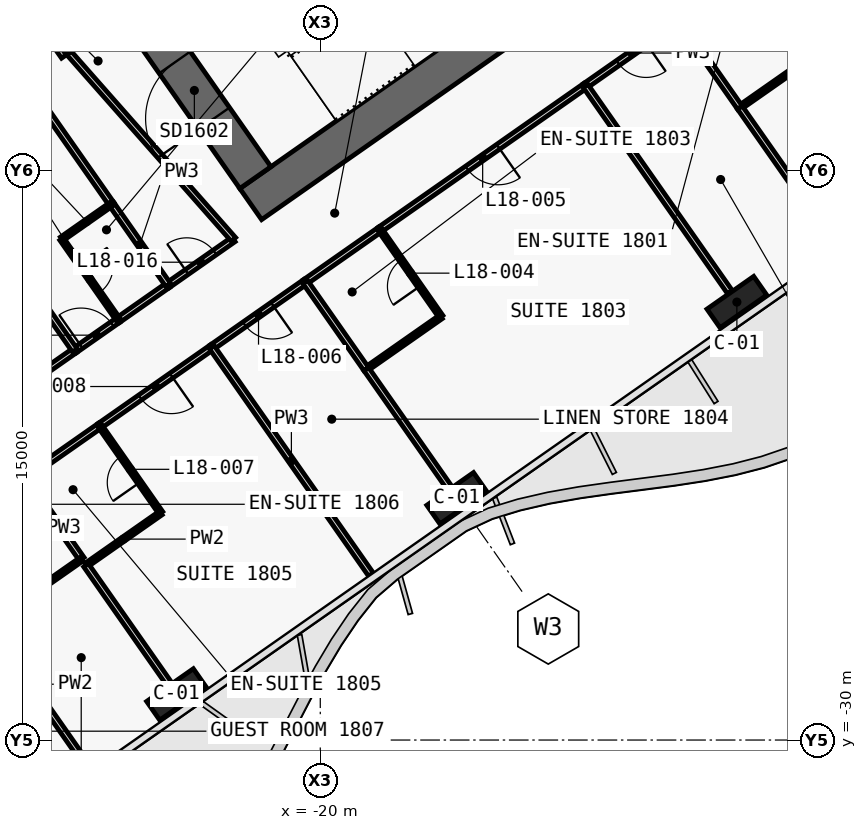
"""IFC4 building model, lengths in metres.
Left out: names, types, materials, properties, quantities, classifications, styles, units other than length and angle.
Written with IfcOpenShell. Run it as: python <this file> out.ifc"""

import sys

from ifc_helpers import new_model, si_unit, direction, frame, frame_2d, origin, origin_2d, place, context, subcontext, project, spatial, polyline, rectangle, outline, extrude, element, fill, save


model = new_model("IFC4")
c1 = context("Model", 3, precision=1e-05, world=origin(), true_north=direction((0.0, 1.0)))
c2 = subcontext(c1, "Body", "Model", "MODEL_VIEW")
j1 = project(units=[si_unit("LENGTHUNIT", "METRE"), si_unit("PLANEANGLEUNIT", "RADIAN")], contexts=[c1])
p1 = place(None, origin())
s1 = spatial("IfcSite", under=j1, at=p1, CompositionType="ELEMENT")
p2 = place(p1, origin())
s2 = spatial("IfcBuilding", under=s1, at=p2, CompositionType="ELEMENT")
p3 = place(p2, frame((0.0, 0.0, 90.5)))
s3 = spatial("IfcBuildingStorey", under=s2, at=p3, CompositionType="ELEMENT", Elevation=90.5)
p4 = place(p3, frame((0.037, -0.585, 0.0), z_axis=(0.0, 0.0, 1.0), x_axis=(-0.819157152511, -0.573569140985, 0.0)))
e1 = element("IfcWall", 1, at=p4, inside=s3, PredefinedType="SHEAR", context=c2, shape_type="SweptSolid", body=[
    extrude(outline(polyline([(26.695, 0.5), (0.7, 0.5), (0.0, -0.5), (26.695, -0.5), (26.695, 0.5)])), origin(), (0.0, 0.0, 1.0), 3.6),
])
p5 = place(p4, frame((2.995, 0.0, 0.0)))
e2 = element("IfcOpeningElement", 2, at=p5, cuts=e1, PredefinedType="OPENING", context=c2, shape_type="SweptSolid", body=[
    extrude(rectangle(XDim=2.4, YDim=2.1, at=frame_2d((1.2, 1.05))), frame((0.0, 0.51, 0.0), z_axis=(0.0, -1.0, 0.0), x_axis=(1.0, 0.0, 0.0)), (0.0, 0.0, 1.0), 1.02),
])
p6 = place(p4, frame((11.995, 0.0, 0.0)))
e3 = element("IfcOpeningElement", 3, at=p6, cuts=e1, PredefinedType="OPENING", context=c2, shape_type="SweptSolid", body=[
    extrude(rectangle(XDim=2.4, YDim=2.1, at=frame_2d((1.2, 1.05))), frame((0.0, 0.51, 0.0), z_axis=(0.0, -1.0, 0.0), x_axis=(1.0, 0.0, 0.0)), (0.0, 0.0, 1.0), 1.02),
])
p7 = place(p3, frame((-21.708, -15.2, 0.0), z_axis=(0.0, 0.0, 1.0), x_axis=(-0.573576324356, 0.819152122709, 0.0)))
e4 = element("IfcWall", 4, at=p7, inside=s3, PredefinedType="SHEAR", context=c2, shape_type="SweptSolid", body=[
    extrude(outline(polyline([(0.0, 0.5), (0.0, -0.5), (9.2, -0.5), (9.2, 0.5), (0.0, 0.5)])), origin(), (0.0, 0.0, 1.0), 3.6),
])
p8 = place(p7, frame((6.1, 0.0, 0.0)))
e5 = element("IfcOpeningElement", 5, at=p8, cuts=e4, PredefinedType="OPENING", context=c2, shape_type="SweptSolid", body=[
    extrude(rectangle(XDim=1.8, YDim=2.1, at=frame_2d((0.9, 1.05))), frame((0.0, 0.51, 0.0), z_axis=(0.0, -1.0, 0.0), x_axis=(1.0, 0.0, 0.0)), (0.0, 0.0, 1.0), 1.02),
])
p9 = place(p7, frame((1.9, 0.0, 0.0)))
e6 = element("IfcOpeningElement", 6, at=p9, cuts=e4, PredefinedType="OPENING", context=c2, shape_type="SweptSolid", body=[
    extrude(rectangle(XDim=1.8, YDim=2.1, at=frame_2d((0.9, 1.05))), frame((0.0, 0.51, 0.0), z_axis=(0.0, -1.0, 0.0), x_axis=(1.0, 0.0, 0.0)), (0.0, 0.0, 1.0), 1.02),
])
for number, where, z_axis, x_axis in (
    (7, (-9.038, -18.475, 0.0), (0.0, 0.0, 1.0), (-0.819, -0.574, 0.0)),
    (8, (-16.41, -23.637, 0.0), (0.0, 0.0, 1.0), (-0.819, -0.574, 0.0)),
    (9, (-23.782, -28.799, 0.0), (0.0, 0.0, 1.0), (-0.819, -0.574, 0.0)),
):
    element("IfcColumn", number, at=place(p3, frame(where, z_axis=z_axis, x_axis=x_axis)), inside=s3, PredefinedType="COLUMN", context=c2, shape_type="SweptSolid", body=[
        extrude(rectangle(XDim=1.5, YDim=0.6, at=origin_2d()), origin(), (0.0, 0.0, 1.0), 3.6),
    ])
p10 = place(p3, frame((-24.003, -18.028, 0.0), z_axis=(0.0, 0.0, 1.0), x_axis=(0.819160859995, 0.573563846013, 0.0)))
e10 = element("IfcWall", 10, at=p10, inside=s3, PredefinedType="PARTITIONING", context=c2, shape_type="SweptSolid", body=[
    extrude(rectangle(XDim=2.098, YDim=0.15, at=frame_2d((1.049, 0.0))), origin(), (0.0, 0.0, 1.0), 3.32),
])
p11 = place(p10, frame((0.599, 0.0, 0.0)))
e11 = element("IfcOpeningElement", 11, at=p11, cuts=e10, PredefinedType="OPENING", context=c2, shape_type="SweptSolid", body=[
    extrude(rectangle(XDim=0.9, YDim=2.1, at=frame_2d((0.45, 1.05))), frame((0.0, 0.085, 0.0), z_axis=(0.0, -1.0, 0.0), x_axis=(1.0, 0.0, 0.0)), (0.0, 0.0, 1.0), 0.17),
])
p12 = place(p3, frame((-26.46, -19.748, 0.0), z_axis=(0.0, 0.0, 1.0), x_axis=(0.819199220913, 0.573509055252, 0.0)))
e12 = element("IfcWall", 12, at=p12, inside=s3, PredefinedType="PARTITIONING", context=c2, shape_type="SweptSolid", body=[
    extrude(rectangle(XDim=1.403, YDim=0.15, at=frame_2d((0.702, 0.0))), origin(), (0.0, 0.0, 1.0), 3.32),
])
p13 = place(p12, frame((0.202, 0.0, 0.0)))
e13 = element("IfcOpeningElement", 13, at=p13, cuts=e12, PredefinedType="OPENING", context=c2, shape_type="SweptSolid", body=[
    extrude(rectangle(XDim=1.0, YDim=2.1, at=frame_2d((0.5, 1.05))), frame((0.0, 0.085, 0.0), z_axis=(0.0, -1.0, 0.0), x_axis=(1.0, 0.0, 0.0)), (0.0, 0.0, 1.0), 0.17),
])
for number, where, z_axis, x_axis in (
    (14, (-25.313, -18.945, 0.0), (0.0, 0.0, 1.0), (0.819, 0.574, 0.0)),
    (15, (-27.771, -20.666, 0.0), (0.0, 0.0, 1.0), (0.819, 0.574, 0.0)),
):
    element("IfcWall", number, at=place(p3, frame(where, z_axis=z_axis, x_axis=x_axis)), inside=s3, PredefinedType="PARTITIONING", context=c2, shape_type="SweptSolid", body=[
        extrude(rectangle(XDim=1.604, YDim=0.15, at=frame_2d((0.802, 0.0))), origin(), (0.0, 0.0, 1.0), 3.32),
    ])
p14 = place(p3, frame((-10.565, -11.06, 0.0), z_axis=(0.0, 0.0, 1.0), x_axis=(-0.81916700466, -0.573555070134, 0.0)))
e16 = element("IfcWall", 16, at=p14, inside=s3, PredefinedType="PARTITIONING", context=c2, shape_type="SweptSolid", body=[
    extrude(rectangle(XDim=3.004, YDim=0.15, at=frame_2d((1.502, 0.0))), origin(), (0.0, 0.0, 1.0), 2.6),
])
p15 = place(p14, frame((1.052, 0.0, 0.0)))
e17 = element("IfcOpeningElement", 17, at=p15, cuts=e16, PredefinedType="OPENING", context=c2, shape_type="SweptSolid", body=[
    extrude(rectangle(XDim=0.9, YDim=2.1, at=frame_2d((0.45, 1.05))), frame((0.0, 0.085, 0.0), z_axis=(0.0, -1.0, 0.0), x_axis=(1.0, 0.0, 0.0)), (0.0, 0.0, 1.0), 0.17),
])
p16 = place(p3, frame((-13.022, -12.781, 0.0), z_axis=(0.0, 0.0, 1.0), x_axis=(-0.819141582452, -0.573591377113, 0.0)))
e18 = element("IfcWall", 18, at=p16, inside=s3, PredefinedType="PARTITIONING", context=c2, shape_type="SweptSolid", body=[
    extrude(rectangle(XDim=6.603, YDim=0.15, at=frame_2d((3.301, 0.0))), origin(), (0.0, 0.0, 1.0), 2.6),
])
p17 = place(p16, frame((2.802, 0.0, 0.0)))
e19 = element("IfcOpeningElement", 19, at=p17, cuts=e18, PredefinedType="OPENING", context=c2, shape_type="SweptSolid", body=[
    extrude(rectangle(XDim=1.0, YDim=2.1, at=frame_2d((0.5, 1.05))), frame((0.0, 0.085, 0.0), z_axis=(0.0, -1.0, 0.0), x_axis=(1.0, 0.0, 0.0)), (0.0, 0.0, 1.0), 0.17),
])
p18 = place(p3, frame((-18.429, -16.566, 0.0), z_axis=(0.0, 0.0, 1.0), x_axis=(-0.819146032251, -0.573585022335, 0.0)))
e20 = element("IfcWall", 20, at=p18, inside=s3, PredefinedType="PARTITIONING", context=c2, shape_type="SweptSolid", body=[
    extrude(rectangle(XDim=2.404, YDim=0.15, at=frame_2d((1.202, 0.0))), origin(), (0.0, 0.0, 1.0), 2.6),
])
p19 = place(p3, frame((-20.395, -17.943, 0.0), z_axis=(0.0, 0.0, 1.0), x_axis=(-0.819128818764, -0.573609604409, 0.0)))
e21 = element("IfcWall", 21, at=p19, inside=s3, PredefinedType="PARTITIONING", context=c2, shape_type="SweptSolid", body=[
    extrude(rectangle(XDim=3.004, YDim=0.15, at=frame_2d((1.502, 0.0))), origin(), (0.0, 0.0, 1.0), 2.6),
])
p20 = place(p19, frame((1.052, 0.0, 0.0)))
e22 = element("IfcOpeningElement", 22, at=p20, cuts=e21, PredefinedType="OPENING", context=c2, shape_type="SweptSolid", body=[
    extrude(rectangle(XDim=0.9, YDim=2.1, at=frame_2d((0.45, 1.05))), frame((0.0, 0.085, 0.0), z_axis=(0.0, -1.0, 0.0), x_axis=(1.0, 0.0, 0.0)), (0.0, 0.0, 1.0), 0.17),
])
p21 = place(p3, frame((-22.852, -19.664, 0.0), z_axis=(0.0, 0.0, 1.0), x_axis=(-0.819145961204, -0.573585123798, 0.0)))
e23 = element("IfcWall", 23, at=p21, inside=s3, PredefinedType="PARTITIONING", context=c2, shape_type="SweptSolid", body=[
    extrude(rectangle(XDim=3.603, YDim=0.15, at=frame_2d((1.802, 0.0))), origin(), (0.0, 0.0, 1.0), 3.32),
])
p22 = place(p21, frame((1.302, 0.0, 0.0)))
e24 = element("IfcOpeningElement", 24, at=p22, cuts=e23, PredefinedType="OPENING", context=c2, shape_type="SweptSolid", body=[
    extrude(rectangle(XDim=1.0, YDim=2.1, at=frame_2d((0.5, 1.05))), frame((0.0, 0.085, 0.0), z_axis=(0.0, -1.0, 0.0), x_axis=(1.0, 0.0, 0.0)), (0.0, 0.0, 1.0), 0.17),
])
p23 = place(p3, frame((-25.801, -21.729, 0.0), z_axis=(0.0, 0.0, 1.0), x_axis=(-0.819179439794, -0.573537309527, 0.0)))
e25 = element("IfcWall", 25, at=p23, inside=s3, PredefinedType="PARTITIONING", context=c2, shape_type="SweptSolid", body=[
    extrude(rectangle(XDim=2.404, YDim=0.15, at=frame_2d((1.202, 0.0))), origin(), (0.0, 0.0, 1.0), 2.6),
])
p24 = place(p3, frame((-26.746, -12.014, 0.0), z_axis=(0.0, 0.0, 1.0), x_axis=(-0.573560650686, 0.819163097304, 0.0)))
e26 = element("IfcWall", 26, at=p24, inside=s3, PredefinedType="PARTITIONING", context=c2, shape_type="SweptSolid", body=[
    extrude(rectangle(XDim=3.0, YDim=0.15, at=frame_2d((1.5, 0.0))), origin(), (0.0, 0.0, 1.0), 3.32),
])
p25 = place(p3, frame((-22.284, -16.827, 0.0), z_axis=(0.0, 0.0, 1.0), x_axis=(-0.661545117561, 0.749905365651, 0.0)))
e27 = element("IfcWall", 27, at=p25, inside=s3, PredefinedType="PARTITIONING", context=c2, shape_type="SweptSolid", body=[
    extrude(rectangle(XDim=6.543, YDim=0.15, at=frame_2d((3.271, 0.0))), origin(), (0.0, 0.0, 1.0), 2.6),
])
p26 = place(p3, frame((-25.492, -15.897, 0.0), z_axis=(0.0, 0.0, 1.0), x_axis=(-0.573579093502, 0.819150183725, 0.0)))
e28 = element("IfcWall", 28, at=p26, inside=s3, PredefinedType="PARTITIONING", context=c2, shape_type="SweptSolid", body=[
    extrude(rectangle(XDim=8.701, YDim=0.15, at=frame_2d((4.351, 0.0))), origin(), (0.0, 0.0, 1.0), 2.6),
])
p27 = place(p3, frame((-24.001, -18.026, 0.0), z_axis=(0.0, 0.0, 1.0), x_axis=(-0.573588285102, 0.819143747577, 0.0)))
e29 = element("IfcWall", 29, at=p27, inside=s3, PredefinedType="PARTITIONING", context=c2, shape_type="SweptSolid", body=[
    extrude(rectangle(XDim=2.602, YDim=0.15, at=frame_2d((1.301, 0.0))), origin(), (0.0, 0.0, 1.0), 2.6),
])
p28 = place(p3, frame((-25.493, -15.896, 0.0), z_axis=(0.0, 0.0, 1.0), x_axis=(-0.819059844958, -0.573708088123, 0.0)))
e30 = element("IfcWall", 30, at=p28, inside=s3, PredefinedType="PARTITIONING", context=c2, shape_type="SweptSolid", body=[
    extrude(rectangle(XDim=1.6, YDim=0.12, at=frame_2d((0.8, 0.0))), origin(), (0.0, 0.0, 1.0), 3.32),
])
p29 = place(p3, frame((-26.804, -16.815, 0.0), z_axis=(0.0, 0.0, 1.0), x_axis=(0.573582085028, -0.819148089014, 0.0)))
e31 = element("IfcWall", 31, at=p29, inside=s3, PredefinedType="PARTITIONING", context=c2, shape_type="SweptSolid", body=[
    extrude(rectangle(XDim=2.6, YDim=0.12, at=frame_2d((1.3, 0.0))), origin(), (0.0, 0.0, 1.0), 2.6),
])
p30 = place(p29, frame((0.875, 0.0, 0.0)))
e32 = element("IfcOpeningElement", 32, at=p30, cuts=e31, PredefinedType="OPENING", context=c2, shape_type="SweptSolid", body=[
    extrude(rectangle(XDim=0.85, YDim=2.05, at=frame_2d((0.425, 1.025))), frame((0.0, 0.07, 0.0), z_axis=(0.0, -1.0, 0.0), x_axis=(1.0, 0.0, 0.0)), (0.0, 0.0, 1.0), 0.14),
])
p31 = place(p3, frame((-26.458, -19.747, 0.0), z_axis=(0.0, 0.0, 1.0), x_axis=(-0.573544201094, 0.819174614714, 0.0)))
e33 = element("IfcWall", 33, at=p31, inside=s3, PredefinedType="PARTITIONING", context=c2, shape_type="SweptSolid", body=[
    extrude(rectangle(XDim=2.602, YDim=0.15, at=frame_2d((1.301, 0.0))), origin(), (0.0, 0.0, 1.0), 2.6),
])
p32 = place(p3, frame((-8.96, -13.355, 0.0), z_axis=(0.0, 0.0, 1.0), x_axis=(0.819188907105, 0.573523787192, 0.0)))
e34 = element("IfcWall", 34, at=p32, inside=s3, PredefinedType="PARTITIONING", context=c2, shape_type="SweptSolid", body=[
    extrude(rectangle(XDim=2.4, YDim=0.12, at=frame_2d((1.2, 0.0))), origin(), (0.0, 0.0, 1.0), 3.32),
])
p33 = place(p3, frame((-6.994, -11.978, 0.0), z_axis=(0.0, 0.0, 1.0), x_axis=(-0.573550118428, 0.819170471667, 0.0)))
e35 = element("IfcWall", 35, at=p33, inside=s3, PredefinedType="PARTITIONING", context=c2, shape_type="SweptSolid", body=[
    extrude(rectangle(XDim=2.8, YDim=0.12, at=frame_2d((1.4, 0.0))), origin(), (0.0, 0.0, 1.0), 3.32),
])
p34 = place(p33, frame((0.975, 0.0, 0.0)))
e36 = element("IfcOpeningElement", 36, at=p34, cuts=e35, PredefinedType="OPENING", context=c2, shape_type="SweptSolid", body=[
    extrude(rectangle(XDim=0.85, YDim=2.05, at=frame_2d((0.425, 1.025))), frame((0.0, 0.07, 0.0), z_axis=(0.0, -1.0, 0.0), x_axis=(1.0, 0.0, 0.0)), (0.0, 0.0, 1.0), 0.14),
])
p35 = place(p3, frame((-6.379, -17.041, 0.0), z_axis=(0.0, 0.0, 1.0), x_axis=(-0.573564311442, 0.819160534108, 0.0)))
e37 = element("IfcWall", 37, at=p35, inside=s3, PredefinedType="PARTITIONING", context=c2, shape_type="SweptSolid", body=[
    extrude(rectangle(XDim=4.499, YDim=0.15, at=frame_2d((2.25, 0.0))), origin(), (0.0, 0.0, 1.0), 2.5),
])
p36 = place(p3, frame((-8.96, -13.355, 0.0), z_axis=(0.0, 0.0, 1.0), x_axis=(-0.573608623498, 0.819129505664, 0.0)))
e38 = element("IfcWall", 38, at=p36, inside=s3, PredefinedType="PARTITIONING", context=c2, shape_type="SweptSolid", body=[
    extrude(rectangle(XDim=2.8, YDim=0.15, at=frame_2d((1.4, 0.0))), origin(), (0.0, 0.0, 1.0), 3.32),
])
p37 = place(p3, frame((-9.221, -18.213, 0.0), z_axis=(0.0, 0.0, 1.0), x_axis=(-0.573556251799, 0.819166177294, 0.0)))
e39 = element("IfcWall", 39, at=p37, inside=s3, PredefinedType="PARTITIONING", context=c2, shape_type="SweptSolid", body=[
    extrude(rectangle(XDim=6.63, YDim=0.15, at=frame_2d((3.315, 0.0))), origin(), (0.0, 0.0, 1.0), 2.6),
])
p38 = place(p3, frame((-18.79, -20.239, 0.0), z_axis=(0.0, 0.0, 1.0), x_axis=(0.819141114317, 0.573592045652, 0.0)))
e40 = element("IfcWall", 40, at=p38, inside=s3, PredefinedType="PARTITIONING", context=c2, shape_type="SweptSolid", body=[
    extrude(rectangle(XDim=2.4, YDim=0.12, at=frame_2d((1.2, 0.0))), origin(), (0.0, 0.0, 1.0), 2.6),
])
p39 = place(p3, frame((-16.823, -18.861, 0.0), z_axis=(0.0, 0.0, 1.0), x_axis=(-0.573608623498, 0.819129505664, 0.0)))
e41 = element("IfcWall", 41, at=p39, inside=s3, PredefinedType="PARTITIONING", context=c2, shape_type="SweptSolid", body=[
    extrude(rectangle(XDim=2.8, YDim=0.12, at=frame_2d((1.4, 0.0))), origin(), (0.0, 0.0, 1.0), 3.32),
])
p40 = place(p39, frame((0.975, 0.0, 0.0)))
e42 = element("IfcOpeningElement", 42, at=p40, cuts=e41, PredefinedType="OPENING", context=c2, shape_type="SweptSolid", body=[
    extrude(rectangle(XDim=0.85, YDim=2.05, at=frame_2d((0.425, 1.025))), frame((0.0, 0.07, 0.0), z_axis=(0.0, -1.0, 0.0), x_axis=(1.0, 0.0, 0.0)), (0.0, 0.0, 1.0), 0.14),
])
p41 = place(p3, frame((-16.594, -23.375, 0.0), z_axis=(0.0, 0.0, 1.0), x_axis=(-0.573594994199, 0.819139049631, 0.0)))
e43 = element("IfcWall", 43, at=p41, inside=s3, PredefinedType="PARTITIONING", context=c2, shape_type="SweptSolid", body=[
    extrude(rectangle(XDim=3.829, YDim=0.15, at=frame_2d((1.915, 0.0))), origin(), (0.0, 0.0, 1.0), 2.6),
])
p42 = place(p3, frame((-18.79, -20.238, 0.0), z_axis=(0.0, 0.0, 1.0), x_axis=(-0.57364959175, 0.819100815459, 0.0)))
e44 = element("IfcWall", 44, at=p42, inside=s3, PredefinedType="PARTITIONING", context=c2, shape_type="SweptSolid", body=[
    extrude(rectangle(XDim=2.8, YDim=0.15, at=frame_2d((1.4, 0.0))), origin(), (0.0, 0.0, 1.0), 2.6),
])
p43 = place(p3, frame((-18.667, -25.645, 0.0), z_axis=(0.0, 0.0, 1.0), x_axis=(-0.573572324301, 0.819154923562, 0.0)))
e45 = element("IfcWall", 45, at=p43, inside=s3, PredefinedType="PARTITIONING", context=c2, shape_type="SweptSolid", body=[
    extrude(rectangle(XDim=7.3, YDim=0.15, at=frame_2d((3.65, 0.0))), origin(), (0.0, 0.0, 1.0), 2.5),
])
p44 = place(p3, frame((-26.162, -25.401, 0.0), z_axis=(0.0, 0.0, 1.0), x_axis=(0.819155442668, 0.573571582932, 0.0)))
e46 = element("IfcWall", 46, at=p44, inside=s3, PredefinedType="PARTITIONING", context=c2, shape_type="SweptSolid", body=[
    extrude(rectangle(XDim=2.4, YDim=0.12, at=frame_2d((1.2, 0.0))), origin(), (0.0, 0.0, 1.0), 2.6),
])
p45 = place(p3, frame((-24.196, -24.023, 0.0), z_axis=(0.0, 0.0, 1.0), x_axis=(-0.573608623498, 0.819129505664, 0.0)))
e47 = element("IfcWall", 47, at=p45, inside=s3, PredefinedType="PARTITIONING", context=c2, shape_type="SweptSolid", body=[
    extrude(rectangle(XDim=2.8, YDim=0.12, at=frame_2d((1.4, 0.0))), origin(), (0.0, 0.0, 1.0), 3.32),
])
p46 = place(p45, frame((0.975, 0.0, 0.0)))
e48 = element("IfcOpeningElement", 48, at=p46, cuts=e47, PredefinedType="OPENING", context=c2, shape_type="SweptSolid", body=[
    extrude(rectangle(XDim=0.85, YDim=2.05, at=frame_2d((0.425, 1.025))), frame((0.0, 0.07, 0.0), z_axis=(0.0, -1.0, 0.0), x_axis=(1.0, 0.0, 0.0)), (0.0, 0.0, 1.0), 0.14),
])
p47 = place(p3, frame((-23.966, -28.537, 0.0), z_axis=(0.0, 0.0, 1.0), x_axis=(-0.573594994199, 0.819139049631, 0.0)))
e49 = element("IfcWall", 49, at=p47, inside=s3, PredefinedType="PARTITIONING", context=c2, shape_type="SweptSolid", body=[
    extrude(rectangle(XDim=3.829, YDim=0.15, at=frame_2d((1.915, 0.0))), origin(), (0.0, 0.0, 1.0), 2.6),
])
p48 = place(p3, frame((-26.276, -25.238, 0.0), z_axis=(0.0, 0.0, 1.0), x_axis=(-0.573588285102, 0.819143747577, 0.0)))
e50 = element("IfcWall", 50, at=p48, inside=s3, PredefinedType="PARTITIONING", context=c2, shape_type="SweptSolid", body=[
    extrude(rectangle(XDim=2.602, YDim=0.15, at=frame_2d((1.301, 0.0))), origin(), (0.0, 0.0, 1.0), 2.6),
])
p49 = place(p3, frame((-27.587, -26.155, 0.0), z_axis=(0.0, 0.0, 1.0), x_axis=(0.819131543282, 0.57360571371, 0.0)))
e51 = element("IfcWall", 51, at=p49, inside=s3, PredefinedType="PARTITIONING", context=c2, shape_type="SweptSolid", body=[
    extrude(rectangle(XDim=1.6, YDim=0.12, at=frame_2d((0.8, 0.0))), origin(), (0.0, 0.0, 1.0), 2.6),
])
p50 = place(p3, frame((-26.039, -30.807, 0.0), z_axis=(0.0, 0.0, 1.0), x_axis=(-0.573594765376, 0.819139209862, 0.0)))
e52 = element("IfcWall", 52, at=p50, inside=s3, PredefinedType="PARTITIONING", context=c2, shape_type="SweptSolid", body=[
    extrude(rectangle(XDim=7.3, YDim=0.15, at=frame_2d((3.65, 0.0))), origin(), (0.0, 0.0, 1.0), 2.5),
])
p51 = place(p9, origin())
e53 = element("IfcDoor", 53, at=p51, inside=s3, OperationType="DOUBLE_DOOR_SINGLE_SWING", PredefinedType="DOOR", context=c2, shape_type="SweptSolid", body=[
    extrude(rectangle(XDim=1.8, YDim=2.1, at=frame_2d((0.9, 1.05))), frame((0.0, 0.025, 0.0), z_axis=(0.0, -1.0, 0.0), x_axis=(1.0, 0.0, 0.0)), (0.0, 0.0, 1.0), 0.05),
])
fill(e6, e53)
p52 = place(p15, origin())
e54 = element("IfcDoor", 54, at=p52, inside=s3, OperationType="SINGLE_SWING_RIGHT", PredefinedType="DOOR", context=c2, shape_type="SweptSolid", body=[
    extrude(rectangle(XDim=0.9, YDim=2.1, at=frame_2d((0.45, 1.05))), frame((0.0, 0.025, 0.0), z_axis=(0.0, -1.0, 0.0), x_axis=(1.0, 0.0, 0.0)), (0.0, 0.0, 1.0), 0.05),
])
fill(e17, e54)
p53 = place(p40, origin())
e55 = element("IfcDoor", 55, at=p53, inside=s3, OperationType="SINGLE_SWING_RIGHT", PredefinedType="DOOR", context=c2, shape_type="SweptSolid", body=[
    extrude(rectangle(XDim=0.85, YDim=2.05, at=frame_2d((0.425, 1.025))), frame((0.0, 0.025, 0.0), z_axis=(0.0, -1.0, 0.0), x_axis=(1.0, 0.0, 0.0)), (0.0, 0.0, 1.0), 0.05),
])
fill(e42, e55)
p54 = place(p17, origin())
e56 = element("IfcDoor", 56, at=p54, inside=s3, OperationType="SINGLE_SWING_RIGHT", PredefinedType="DOOR", context=c2, shape_type="SweptSolid", body=[
    extrude(rectangle(XDim=1.0, YDim=2.1, at=frame_2d((0.5, 1.05))), frame((0.0, 0.025, 0.0), z_axis=(0.0, -1.0, 0.0), x_axis=(1.0, 0.0, 0.0)), (0.0, 0.0, 1.0), 0.05),
])
fill(e19, e56)
p55 = place(p20, origin())
e57 = element("IfcDoor", 57, at=p55, inside=s3, OperationType="SINGLE_SWING_LEFT", PredefinedType="DOOR", context=c2, shape_type="SweptSolid", body=[
    extrude(rectangle(XDim=0.9, YDim=2.1, at=frame_2d((0.45, 1.05))), frame((0.0, 0.025, 0.0), z_axis=(0.0, -1.0, 0.0), x_axis=(1.0, 0.0, 0.0)), (0.0, 0.0, 1.0), 0.05),
])
fill(e22, e57)
p56 = place(p46, origin())
e58 = element("IfcDoor", 58, at=p56, inside=s3, OperationType="SINGLE_SWING_LEFT", PredefinedType="DOOR", context=c2, shape_type="SweptSolid", body=[
    extrude(rectangle(XDim=0.85, YDim=2.05, at=frame_2d((0.425, 1.025))), frame((0.0, 0.025, 0.0), z_axis=(0.0, -1.0, 0.0), x_axis=(1.0, 0.0, 0.0)), (0.0, 0.0, 1.0), 0.05),
])
fill(e48, e58)
p57 = place(p22, origin())
e59 = element("IfcDoor", 59, at=p57, inside=s3, OperationType="SINGLE_SWING_RIGHT", PredefinedType="DOOR", context=c2, shape_type="SweptSolid", body=[
    extrude(rectangle(XDim=1.0, YDim=2.1, at=frame_2d((0.5, 1.05))), frame((0.0, 0.025, 0.0), z_axis=(0.0, -1.0, 0.0), x_axis=(1.0, 0.0, 0.0)), (0.0, 0.0, 1.0), 0.05),
])
fill(e24, e59)
p58 = place(p11, origin())
e60 = element("IfcDoor", 60, at=p58, inside=s3, OperationType="SINGLE_SWING_RIGHT", PredefinedType="DOOR", context=c2, shape_type="SweptSolid", body=[
    extrude(rectangle(XDim=0.9, YDim=2.1, at=frame_2d((0.45, 1.05))), frame((0.0, 0.025, 0.0), z_axis=(0.0, -1.0, 0.0), x_axis=(1.0, 0.0, 0.0)), (0.0, 0.0, 1.0), 0.05),
])
fill(e11, e60)
p59 = place(p30, origin())
e61 = element("IfcDoor", 61, at=p59, inside=s3, OperationType="SINGLE_SWING_RIGHT", PredefinedType="DOOR", context=c2, shape_type="SweptSolid", body=[
    extrude(rectangle(XDim=0.85, YDim=2.05, at=frame_2d((0.425, 1.025))), frame((0.0, 0.025, 0.0), z_axis=(0.0, -1.0, 0.0), x_axis=(1.0, 0.0, 0.0)), (0.0, 0.0, 1.0), 0.05),
])
fill(e32, e61)
p60 = place(p13, origin())
e62 = element("IfcDoor", 62, at=p60, inside=s3, OperationType="SINGLE_SWING_LEFT", PredefinedType="DOOR", context=c2, shape_type="SweptSolid", body=[
    extrude(rectangle(XDim=1.0, YDim=2.1, at=frame_2d((0.5, 1.05))), frame((0.0, 0.025, 0.0), z_axis=(0.0, -1.0, 0.0), x_axis=(1.0, 0.0, 0.0)), (0.0, 0.0, 1.0), 0.05),
])
fill(e13, e62)
save(model, sys.argv[1])
